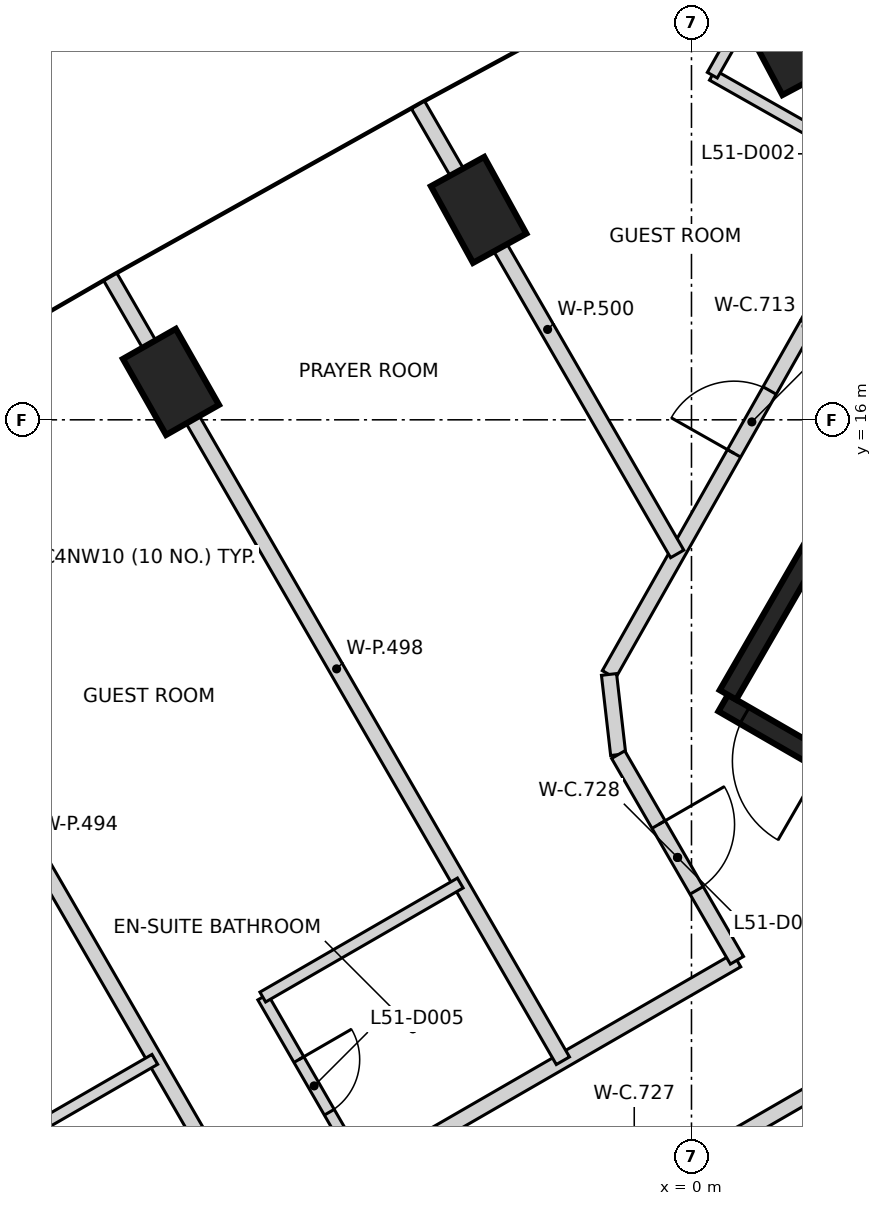
"""IFC4 building model, lengths in metres.
Left out: names, types, materials, properties, quantities, classifications, styles, units other than length and angle.
Written with IfcOpenShell. Run it as: python <this file> out.ifc"""

import sys

from ifc_helpers import new_model, si_unit, direction, frame, frame_2d, origin, origin_2d, place, context, subcontext, project, spatial, rectangle, extrude, element, fill, save


model = new_model("IFC4")
c1 = context("Model", 3, precision=1e-05, world=origin(), true_north=direction((0.0, 1.0)))
c2 = subcontext(c1, "Body", "Model", "MODEL_VIEW")
j1 = project(units=[si_unit("LENGTHUNIT", "METRE"), si_unit("PLANEANGLEUNIT", "RADIAN")], contexts=[c1])
p1 = place(None, origin())
s1 = spatial("IfcSite", under=j1, at=p1, CompositionType="ELEMENT")
p2 = place(p1, origin())
s2 = spatial("IfcBuilding", under=s1, at=p2, CompositionType="ELEMENT")
p3 = place(p2, frame((0.0, 0.0, 204.4)))
s3 = spatial("IfcBuildingStorey", under=s2, at=p3, CompositionType="ELEMENT", Elevation=204.4)
for number, where, z_axis, x_axis in (
    (1, (1.279, 20.968, -0.35), (0.0, 0.0, 1.0), (-0.47, 0.883, 0.0)),
    (2, (-2.8, 18.762, -0.35), (0.0, 0.0, 1.0), (-0.482, 0.876, 0.0)),
    (3, (-6.848, 16.499, -0.35), (0.0, 0.0, 1.0), (-0.494, 0.87, 0.0)),
):
    element("IfcColumn", number, at=place(p3, frame(where, z_axis=z_axis, x_axis=x_axis)), inside=s3, PredefinedType="COLUMN", context=c2, shape_type="SweptSolid", body=[
        extrude(rectangle(XDim=1.15, YDim=0.8, at=origin_2d()), origin(), (0.0, 0.0, 1.0), 3.6),
    ])
p4 = place(p3, frame((10.42, 6.498, 0.0), z_axis=(0.0, 0.0, 1.0), x_axis=(-0.866021906294, 0.500006057782, 0.0)))
e4 = element("IfcWall", 4, at=p4, inside=s3, PredefinedType="SHEAR", context=c2, shape_type="SweptSolid", body=[
    extrude(rectangle(XDim=11.55, YDim=0.25, at=frame_2d((5.775, 0.0))), origin(), (0.0, 0.0, 1.0), 3.25),
])
p5 = place(p4, frame((10.025, 0.0, 0.0)))
e5 = element("IfcOpeningElement", 5, at=p5, cuts=e4, PredefinedType="OPENING", context=c2, shape_type="SweptSolid", body=[
    extrude(rectangle(XDim=1.2, YDim=2.1, at=frame_2d((0.6, 1.05))), frame((0.0, 0.135, 0.0), z_axis=(0.0, -1.0, 0.0), x_axis=(1.0, 0.0, 0.0)), (0.0, 0.0, 1.0), 0.27),
])
p6 = place(p4, frame((8.725, 0.0, 0.0)))
e6 = element("IfcOpeningElement", 6, at=p6, cuts=e4, PredefinedType="OPENING", context=c2, shape_type="SweptSolid", body=[
    extrude(rectangle(XDim=1.2, YDim=2.1, at=frame_2d((0.6, 1.05))), frame((0.0, 0.135, 0.0), z_axis=(0.0, -1.0, 0.0), x_axis=(1.0, 0.0, 0.0)), (0.0, 0.0, 1.0), 0.27),
])
p7 = place(p3, frame((0.48, 12.381, 0.0), z_axis=(0.0, 0.0, 1.0), x_axis=(0.49999885962, 0.866026062182, 0.0)))
e7 = element("IfcWall", 7, at=p7, inside=s3, PredefinedType="SHEAR", context=c2, shape_type="SweptSolid", body=[
    extrude(rectangle(XDim=5.225, YDim=0.25, at=frame_2d((2.612, 0.0))), origin(), (0.0, 0.0, 1.0), 3.25),
])
p8 = place(p3, frame((-10.652, 2.394, 0.0), z_axis=(0.0, 0.0, 1.0), x_axis=(0.866016271077, 0.500015817979, 0.0)))
e8 = element("IfcWall", 8, at=p8, inside=s3, PredefinedType="PARTITIONING", context=c2, shape_type="SweptSolid", body=[
    extrude(rectangle(XDim=12.991, YDim=0.2, at=frame_2d((6.495, 0.0))), origin(), (0.0, 0.0, 1.0), 3.25),
])
p9 = place(p8, frame((5.898, 0.0, 0.0)))
e9 = element("IfcOpeningElement", 9, at=p9, cuts=e8, PredefinedType="OPENING", context=c2, shape_type="SweptSolid", body=[
    extrude(rectangle(XDim=0.95, YDim=2.1, at=frame_2d((0.475, 1.05))), frame((0.0, 0.11, 0.0), z_axis=(0.0, -1.0, 0.0), x_axis=(1.0, 0.0, 0.0)), (0.0, 0.0, 1.0), 0.22),
])
p10 = place(p8, frame((1.571, 0.0, 0.0)))
e10 = element("IfcOpeningElement", 10, at=p10, cuts=e8, PredefinedType="OPENING", context=c2, shape_type="SweptSolid", body=[
    extrude(rectangle(XDim=0.95, YDim=2.1, at=frame_2d((0.475, 1.05))), frame((0.0, 0.11, 0.0), z_axis=(0.0, -1.0, 0.0), x_axis=(1.0, 0.0, 0.0)), (0.0, 0.0, 1.0), 0.22),
])
p11 = place(p3, frame((-4.718, 3.511, 0.0), z_axis=(0.0, 0.0, 1.0), x_axis=(0.865989775611, 0.500061704731, 0.0)))
e11 = element("IfcWall", 11, at=p11, inside=s3, PredefinedType="PARTITIONING", context=c2, shape_type="SweptSolid", body=[
    extrude(rectangle(XDim=9.157, YDim=0.2, at=frame_2d((4.579, 0.0))), origin(), (0.0, 0.0, 1.0), 3.25),
])
p12 = place(p11, frame((4.128, 0.0, 0.0)))
e12 = element("IfcOpeningElement", 12, at=p12, cuts=e11, PredefinedType="OPENING", context=c2, shape_type="SweptSolid", body=[
    extrude(rectangle(XDim=0.9, YDim=2.1, at=frame_2d((0.45, 1.05))), frame((0.0, 0.11, 0.0), z_axis=(0.0, -1.0, 0.0), x_axis=(1.0, 0.0, 0.0)), (0.0, 0.0, 1.0), 0.22),
])
p13 = place(p3, frame((-1.086, 12.65, 0.0), z_axis=(0.0, 0.0, 1.0), x_axis=(0.492552173528, 0.87028291742, 0.0)))
e13 = element("IfcWall", 13, at=p13, inside=s3, PredefinedType="PARTITIONING", context=c2, shape_type="SweptSolid", body=[
    extrude(rectangle(XDim=10.531, YDim=0.2, at=frame_2d((5.266, 0.0))), origin(), (0.0, 0.0, 1.0), 3.25),
])
p14 = place(p13, frame((3.342, 0.0, 0.0)))
e14 = element("IfcOpeningElement", 14, at=p14, cuts=e13, PredefinedType="OPENING", context=c2, shape_type="SweptSolid", body=[
    extrude(rectangle(XDim=0.95, YDim=2.1, at=frame_2d((0.475, 1.05))), frame((0.0, 0.11, 0.0), z_axis=(0.0, -1.0, 0.0), x_axis=(1.0, 0.0, 0.0)), (0.0, 0.0, 1.0), 0.22),
])
p15 = place(p3, frame((-1.085, 12.65, 0.0), z_axis=(0.0, 0.0, 1.0), x_axis=(0.113812454263, -0.993502252264, 0.0)))
e15 = element("IfcWall", 15, at=p15, inside=s3, PredefinedType="PARTITIONING", context=c2, shape_type="SweptSolid", body=[
    extrude(rectangle(XDim=1.062, YDim=0.2, at=frame_2d((0.531, 0.0))), origin(), (0.0, 0.0, 1.0), 3.25),
])
p16 = place(p3, frame((-0.964, 11.595, 0.0), z_axis=(0.0, 0.0, 1.0), x_axis=(0.500056215256, -0.865992945458, 0.0)))
e16 = element("IfcWall", 16, at=p16, inside=s3, PredefinedType="PARTITIONING", context=c2, shape_type="SweptSolid", body=[
    extrude(rectangle(XDim=3.124, YDim=0.2, at=frame_2d((1.562, 0.0))), origin(), (0.0, 0.0, 1.0), 3.25),
])
p17 = place(p16, frame((1.062, 0.0, 0.0)))
e17 = element("IfcOpeningElement", 17, at=p17, cuts=e16, PredefinedType="OPENING", context=c2, shape_type="SweptSolid", body=[
    extrude(rectangle(XDim=1.0, YDim=2.1, at=frame_2d((0.5, 1.05))), frame((0.0, 0.11, 0.0), z_axis=(0.0, -1.0, 0.0), x_axis=(1.0, 0.0, 0.0)), (0.0, 0.0, 1.0), 0.22),
])
p18 = place(p3, frame((-11.661, 15.561, 0.0), z_axis=(0.0, 0.0, 1.0), x_axis=(0.499960887391, -0.866047984282, 0.0)))
e18 = element("IfcWall", 18, at=p18, inside=s3, PredefinedType="PARTITIONING", context=c2, shape_type="SweptSolid", body=[
    extrude(rectangle(XDim=11.907, YDim=0.2, at=frame_2d((5.953, 0.0))), origin(), (0.0, 0.0, 1.0), 3.25),
])
p19 = place(p3, frame((-7.646, 17.879, 0.0), z_axis=(0.0, 0.0, 1.0), x_axis=(0.500042538917, -0.866000842536, 0.0)))
e19 = element("IfcWall", 19, at=p19, inside=s3, PredefinedType="PARTITIONING", context=c2, shape_type="SweptSolid", body=[
    extrude(rectangle(XDim=11.906, YDim=0.2, at=frame_2d((5.953, 0.0))), origin(), (0.0, 0.0, 1.0), 3.25),
])
p20 = place(p3, frame((-4.318, 2.819, 0.0), z_axis=(0.0, 0.0, 1.0), x_axis=(0.866038843867, 0.499976720371, 0.0)))
e20 = element("IfcWall", 20, at=p20, inside=s3, PredefinedType="PARTITIONING", context=c2, shape_type="SweptSolid", body=[
    extrude(rectangle(XDim=8.45, YDim=0.2, at=frame_2d((4.225, 0.0))), origin(), (0.0, 0.0, 1.0), 3.25),
])
p21 = place(p3, frame((-3.598, 20.142, 0.0), z_axis=(0.0, 0.0, 1.0), x_axis=(0.499981732209, -0.866035950442, 0.0)))
e21 = element("IfcWall", 21, at=p21, inside=s3, PredefinedType="PARTITIONING", context=c2, shape_type="SweptSolid", body=[
    extrude(rectangle(XDim=6.82, YDim=0.2, at=frame_2d((3.41, 0.0))), origin(), (0.0, 0.0, 1.0), 3.25),
])
p22 = place(p3, frame((-9.653, 6.089, 0.0), z_axis=(0.0, 0.0, 1.0), x_axis=(0.866021254674, 0.500007186402, 0.0)))
e22 = element("IfcWall", 22, at=p22, inside=s3, PredefinedType="PARTITIONING", context=c2, shape_type="SweptSolid", body=[
    extrude(rectangle(XDim=2.994, YDim=0.15, at=frame_2d((1.497, 0.0))), origin(), (0.0, 0.0, 1.0), 3.25),
])
p23 = place(p3, frame((-5.64, 8.406, 0.0), z_axis=(0.0, 0.0, 1.0), x_axis=(0.50001992892, -0.866013897511, 0.0)))
e23 = element("IfcWall", 23, at=p23, inside=s3, PredefinedType="PARTITIONING", context=c2, shape_type="SweptSolid", body=[
    extrude(rectangle(XDim=2.7, YDim=0.15, at=frame_2d((1.35, 0.0))), origin(), (0.0, 0.0, 1.0), 3.25),
])
p24 = place(p23, frame((0.95, 0.0, 0.0)))
e24 = element("IfcOpeningElement", 24, at=p24, cuts=e23, PredefinedType="OPENING", context=c2, shape_type="SweptSolid", body=[
    extrude(rectangle(XDim=0.8, YDim=2.1, at=frame_2d((0.4, 1.05))), frame((0.0, 0.085, 0.0), z_axis=(0.0, -1.0, 0.0), x_axis=(1.0, 0.0, 0.0)), (0.0, 0.0, 1.0), 0.17),
])
p25 = place(p3, frame((-5.64, 8.406, 0.0), z_axis=(0.0, 0.0, 1.0), x_axis=(0.866010750942, 0.50002537861, 0.0)))
e25 = element("IfcWall", 25, at=p25, inside=s3, PredefinedType="PARTITIONING", context=c2, shape_type="SweptSolid", body=[
    extrude(rectangle(XDim=3.0, YDim=0.15, at=frame_2d((1.5, 0.0))), origin(), (0.0, 0.0, 1.0), 3.25),
])
p26 = place(p3, frame((0.274, 20.534, 0.0), z_axis=(0.0, 0.0, 1.0), x_axis=(0.870234176559, -0.492638283072, 0.0)))
e26 = element("IfcWall", 26, at=p26, inside=s3, PredefinedType="PARTITIONING", context=c2, shape_type="SweptSolid", body=[
    extrude(rectangle(XDim=2.699, YDim=0.15, at=frame_2d((1.35, 0.0))), origin(), (0.0, 0.0, 1.0), 2.35),
])
p27 = place(p26, frame((1.7, 0.0, 0.0)))
e27 = element("IfcOpeningElement", 27, at=p27, cuts=e26, PredefinedType="OPENING", context=c2, shape_type="SweptSolid", body=[
    extrude(rectangle(XDim=0.8, YDim=2.1, at=frame_2d((0.4, 1.05))), frame((0.0, 0.085, 0.0), z_axis=(0.0, -1.0, 0.0), x_axis=(1.0, 0.0, 0.0)), (0.0, 0.0, 1.0), 0.17),
])
p28 = place(p3, frame((0.274, 20.534, 0.0), z_axis=(0.0, 0.0, 1.0), x_axis=(0.492461641571, 0.870334149383, 0.0)))
e28 = element("IfcWall", 28, at=p28, inside=s3, PredefinedType="PARTITIONING", context=c2, shape_type="SweptSolid", body=[
    extrude(rectangle(XDim=2.427, YDim=0.15, at=frame_2d((1.213, 0.0))), origin(), (0.0, 0.0, 1.0), 2.35),
])
p29 = place(p5, origin())
e29 = element("IfcDoor", 29, at=p29, inside=s3, OperationType="SINGLE_SWING_LEFT", PredefinedType="DOOR", context=c2, shape_type="SweptSolid", body=[
    extrude(rectangle(XDim=1.2, YDim=2.1, at=frame_2d((0.6, 1.05))), frame((0.0, 0.025, 0.0), z_axis=(0.0, -1.0, 0.0), x_axis=(1.0, 0.0, 0.0)), (0.0, 0.0, 1.0), 0.05),
])
fill(e5, e29)
p30 = place(p14, origin())
e30 = element("IfcDoor", 30, at=p30, inside=s3, OperationType="SINGLE_SWING_LEFT", PredefinedType="DOOR", context=c2, shape_type="SweptSolid", body=[
    extrude(rectangle(XDim=0.95, YDim=2.1, at=frame_2d((0.475, 1.05))), frame((0.0, 0.025, 0.0), z_axis=(0.0, -1.0, 0.0), x_axis=(1.0, 0.0, 0.0)), (0.0, 0.0, 1.0), 0.05),
])
fill(e14, e30)
p31 = place(p17, frame((1.0, 0.0, 0.0), z_axis=(0.0, 0.0, 1.0), x_axis=(-1.0, 0.0, 0.0)))
e31 = element("IfcDoor", 31, at=p31, inside=s3, OperationType="SINGLE_SWING_LEFT", PredefinedType="DOOR", context=c2, shape_type="SweptSolid", body=[
    extrude(rectangle(XDim=1.0, YDim=2.1, at=frame_2d((0.5, 1.05))), frame((0.0, 0.025, 0.0), z_axis=(0.0, -1.0, 0.0), x_axis=(1.0, 0.0, 0.0)), (0.0, 0.0, 1.0), 0.05),
])
fill(e17, e31)
p32 = place(p24, origin())
e32 = element("IfcDoor", 32, at=p32, inside=s3, OperationType="SINGLE_SWING_LEFT", PredefinedType="DOOR", context=c2, shape_type="SweptSolid", body=[
    extrude(rectangle(XDim=0.8, YDim=2.1, at=frame_2d((0.4, 1.05))), frame((0.0, 0.025, 0.0), z_axis=(0.0, -1.0, 0.0), x_axis=(1.0, 0.0, 0.0)), (0.0, 0.0, 1.0), 0.05),
])
fill(e24, e32)
save(model, sys.argv[1])
